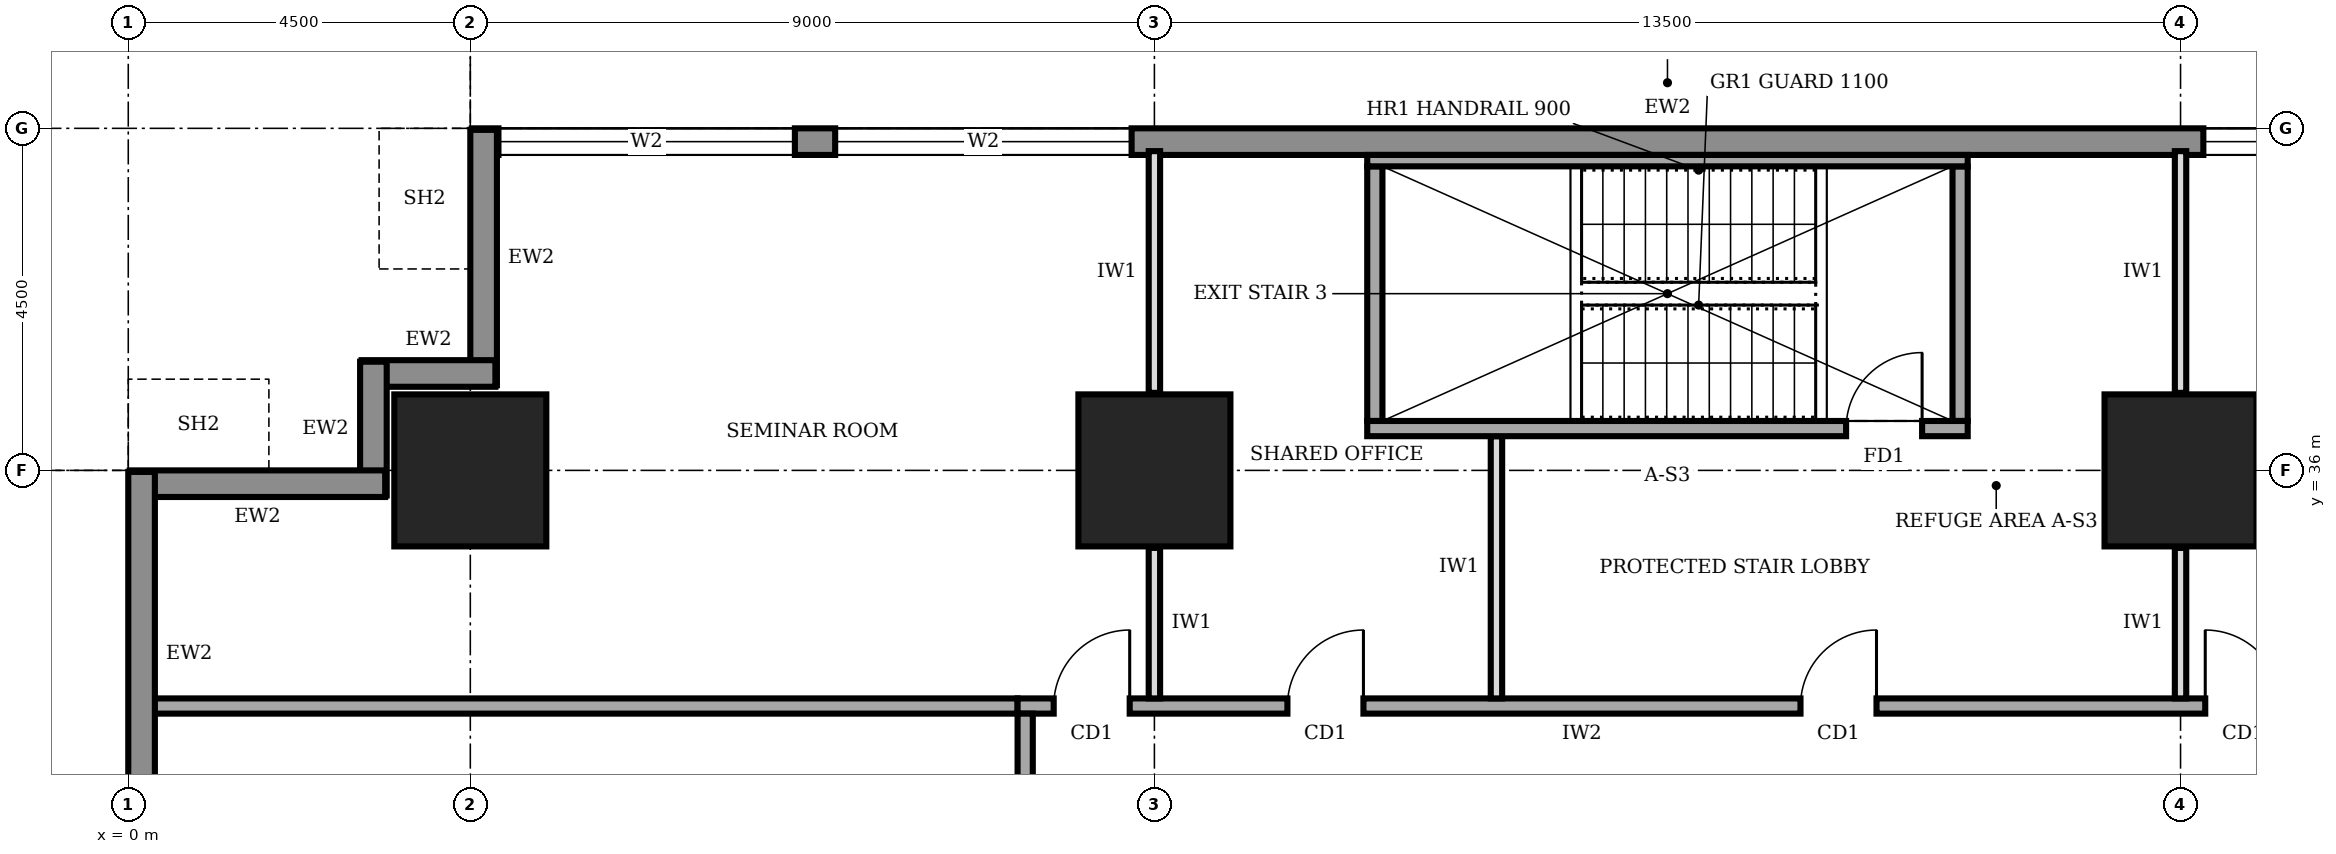
"""IFC4 building model, lengths in metres.
Left out: names, types, materials, properties, quantities, classifications, styles, units other than length and angle.
Written with IfcOpenShell. Run it as: python <this file> out.ifc"""

import sys

from ifc_helpers import new_model, si_unit, direction, frame, frame_2d, origin, origin_2d, place, context, subcontext, project, spatial, rectangle, extrude, element, fill, save


model = new_model("IFC4")
c1 = context("Model", 3, precision=1e-05, world=origin(), true_north=direction((0.0, 1.0)))
c2 = subcontext(c1, "Body", "Model", "MODEL_VIEW")
j1 = project(units=[si_unit("LENGTHUNIT", "METRE"), si_unit("PLANEANGLEUNIT", "RADIAN")], contexts=[c1])
p1 = place(None, origin())
s1 = spatial("IfcSite", under=j1, at=p1, CompositionType="ELEMENT")
p2 = place(p1, origin())
s2 = spatial("IfcBuilding", under=s1, at=p2, CompositionType="ELEMENT")
p3 = place(p2, frame((0.0, 0.0, 57.0)))
s3 = spatial("IfcBuildingStorey", under=s2, at=p3, CompositionType="ELEMENT", Elevation=57.0)
for number, where, z_axis, x_axis in (
    (1, (4.5, 36.0, 0.0), (0.0, 0.0, 1.0), (1.0, 0.0, 0.0)),
    (2, (13.5, 36.0, 0.0), (0.0, 0.0, 1.0), (1.0, 0.0, 0.0)),
    (3, (27.0, 36.0, 0.0), (0.0, 0.0, 1.0), (1.0, 0.0, 0.0)),
):
    element("IfcColumn", number, at=place(p3, frame(where, z_axis=z_axis, x_axis=x_axis)), inside=s3, PredefinedType="COLUMN", context=c2, shape_type="SweptSolid", body=[
        extrude(rectangle(XDim=2.0, YDim=2.0, at=origin_2d()), origin(), (0.0, 0.0, 1.0), 4.0),
    ])
p4 = place(p3, frame((35.98, 40.325, 0.0), z_axis=(0.0, 0.0, 1.0), x_axis=(-1.0, 0.0, 0.0)))
e4 = element("IfcWall", 4, at=p4, inside=s3, PredefinedType="STANDARD", context=c2, shape_type="SweptSolid", body=[
    extrude(rectangle(XDim=31.46, YDim=0.35, at=frame_2d((15.73, 0.0))), origin(), (0.0, 0.0, 1.0), 3.75),
])
p5 = place(p4, frame((27.21, 0.0, 0.6)))
e5 = element("IfcOpeningElement", 5, at=p5, cuts=e4, PredefinedType="OPENING", context=c2, shape_type="SweptSolid", body=[
    extrude(rectangle(XDim=3.9, YDim=2.6, at=frame_2d((1.95, 1.3))), frame((0.0, 0.185, 0.0), z_axis=(0.0, -1.0, 0.0), x_axis=(1.0, 0.0, 0.0)), (0.0, 0.0, 1.0), 0.37),
])
p6 = place(p4, frame((22.78, 0.0, 0.6)))
e6 = element("IfcOpeningElement", 6, at=p6, cuts=e4, PredefinedType="OPENING", context=c2, shape_type="SweptSolid", body=[
    extrude(rectangle(XDim=3.9, YDim=2.6, at=frame_2d((1.95, 1.3))), frame((0.0, 0.185, 0.0), z_axis=(0.0, -1.0, 0.0), x_axis=(1.0, 0.0, 0.0)), (0.0, 0.0, 1.0), 0.37),
])
p7 = place(p4, frame((4.78, 0.0, 0.6)))
e7 = element("IfcOpeningElement", 7, at=p7, cuts=e4, PredefinedType="OPENING", context=c2, shape_type="SweptSolid", body=[
    extrude(rectangle(XDim=3.9, YDim=2.6, at=frame_2d((1.95, 1.3))), frame((0.0, 0.185, 0.0), z_axis=(0.0, -1.0, 0.0), x_axis=(1.0, 0.0, 0.0)), (0.0, 0.0, 1.0), 0.37),
])
p8 = place(p3, frame((4.675, 40.48, 0.0), z_axis=(0.0, 0.0, 1.0), x_axis=(0.0, -1.0, 0.0)))
e8 = element("IfcWall", 8, at=p8, inside=s3, PredefinedType="STANDARD", context=c2, shape_type="SweptSolid", body=[
    extrude(rectangle(XDim=3.36, YDim=0.35, at=frame_2d((1.68, 0.0))), origin(), (0.0, 0.0, 1.0), 2.85),
])
for number, where, z_axis, x_axis in (
    (9, (4.83, 37.275, 0.0), (0.0, 0.0, 1.0), (-1.0, 0.0, 0.0)),
    (10, (3.225, 37.43, 0.0), (0.0, 0.0, 1.0), (0.0, -1.0, 0.0)),
):
    element("IfcWall", number, at=place(p3, frame(where, z_axis=z_axis, x_axis=x_axis)), inside=s3, PredefinedType="STANDARD", context=c2, shape_type="SweptSolid", body=[
        extrude(rectangle(XDim=1.76, YDim=0.35, at=frame_2d((0.88, 0.0))), origin(), (0.0, 0.0, 1.0), 3.75),
    ])
p9 = place(p3, frame((3.38, 35.825, 0.0), z_axis=(0.0, 0.0, 1.0), x_axis=(-1.0, 0.0, 0.0)))
e11 = element("IfcWall", 11, at=p9, inside=s3, PredefinedType="STANDARD", context=c2, shape_type="SweptSolid", body=[
    extrude(rectangle(XDim=3.36, YDim=0.35, at=frame_2d((1.68, 0.0))), origin(), (0.0, 0.0, 1.0), 2.85),
])
p10 = place(p3, frame((0.175, 35.98, 0.0), z_axis=(0.0, 0.0, 1.0), x_axis=(0.0, -1.0, 0.0)))
e12 = element("IfcWall", 12, at=p10, inside=s3, PredefinedType="STANDARD", context=c2, shape_type="SweptSolid", body=[
    extrude(rectangle(XDim=31.46, YDim=0.35, at=frame_2d((15.73, 0.0))), origin(), (0.0, 0.0, 1.0), 3.75),
])
p11 = place(p10, frame((27.21, 0.0, 0.6)))
e13 = element("IfcOpeningElement", 13, at=p11, cuts=e12, PredefinedType="OPENING", context=c2, shape_type="SweptSolid", body=[
    extrude(rectangle(XDim=3.9, YDim=2.6, at=frame_2d((1.95, 1.3))), frame((0.0, 0.185, 0.0), z_axis=(0.0, -1.0, 0.0), x_axis=(1.0, 0.0, 0.0)), (0.0, 0.0, 1.0), 0.37),
])
p12 = place(p10, frame((22.78, 0.0, 0.6)))
e14 = element("IfcOpeningElement", 14, at=p12, cuts=e12, PredefinedType="OPENING", context=c2, shape_type="SweptSolid", body=[
    extrude(rectangle(XDim=3.9, YDim=2.6, at=frame_2d((1.95, 1.3))), frame((0.0, 0.185, 0.0), z_axis=(0.0, -1.0, 0.0), x_axis=(1.0, 0.0, 0.0)), (0.0, 0.0, 1.0), 0.37),
])
p13 = place(p10, frame((18.28, 0.0, 0.6)))
e15 = element("IfcOpeningElement", 15, at=p13, cuts=e12, PredefinedType="OPENING", context=c2, shape_type="SweptSolid", body=[
    extrude(rectangle(XDim=3.9, YDim=2.6, at=frame_2d((1.95, 1.3))), frame((0.0, 0.185, 0.0), z_axis=(0.0, -1.0, 0.0), x_axis=(1.0, 0.0, 0.0)), (0.0, 0.0, 1.0), 0.37),
])
p14 = place(p10, frame((13.78, 0.0, 0.6)))
e16 = element("IfcOpeningElement", 16, at=p14, cuts=e12, PredefinedType="OPENING", context=c2, shape_type="SweptSolid", body=[
    extrude(rectangle(XDim=3.9, YDim=2.6, at=frame_2d((1.95, 1.3))), frame((0.0, 0.185, 0.0), z_axis=(0.0, -1.0, 0.0), x_axis=(1.0, 0.0, 0.0)), (0.0, 0.0, 1.0), 0.37),
])
p15 = place(p10, frame((9.28, 0.0, 0.6)))
e17 = element("IfcOpeningElement", 17, at=p15, cuts=e12, PredefinedType="OPENING", context=c2, shape_type="SweptSolid", body=[
    extrude(rectangle(XDim=3.9, YDim=2.6, at=frame_2d((1.95, 1.3))), frame((0.0, 0.185, 0.0), z_axis=(0.0, -1.0, 0.0), x_axis=(1.0, 0.0, 0.0)), (0.0, 0.0, 1.0), 0.37),
])
p16 = place(p10, frame((4.78, 0.0, 0.6)))
e18 = element("IfcOpeningElement", 18, at=p16, cuts=e12, PredefinedType="OPENING", context=c2, shape_type="SweptSolid", body=[
    extrude(rectangle(XDim=3.9, YDim=2.6, at=frame_2d((1.95, 1.3))), frame((0.0, 0.185, 0.0), z_axis=(0.0, -1.0, 0.0), x_axis=(1.0, 0.0, 0.0)), (0.0, 0.0, 1.0), 0.37),
])
p17 = place(p3, frame((28.6, 32.9, 0.0), z_axis=(0.0, 0.0, 1.0), x_axis=(-1.0, 0.0, 0.0)))
e19 = element("IfcWall", 19, at=p17, inside=s3, PredefinedType="SOLIDWALL", context=c2, shape_type="SweptSolid", body=[
    extrude(rectangle(XDim=16.9, YDim=0.2, at=frame_2d((8.45, 0.0))), origin(), (0.0, 0.0, 1.0), 3.75),
])
p18 = place(p17, frame((15.425, 0.0, 0.0)))
e20 = element("IfcOpeningElement", 20, at=p18, cuts=e19, PredefinedType="OPENING", context=c2, shape_type="SweptSolid", body=[
    extrude(rectangle(XDim=1.0, YDim=2.1, at=frame_2d((0.5, 1.05))), frame((0.0, 0.11, 0.0), z_axis=(0.0, -1.0, 0.0), x_axis=(1.0, 0.0, 0.0)), (0.0, 0.0, 1.0), 0.22),
])
p19 = place(p17, frame((12.35, 0.0, 0.0)))
e21 = element("IfcOpeningElement", 21, at=p19, cuts=e19, PredefinedType="OPENING", context=c2, shape_type="SweptSolid", body=[
    extrude(rectangle(XDim=1.0, YDim=2.1, at=frame_2d((0.5, 1.05))), frame((0.0, 0.11, 0.0), z_axis=(0.0, -1.0, 0.0), x_axis=(1.0, 0.0, 0.0)), (0.0, 0.0, 1.0), 0.22),
])
p20 = place(p17, frame((5.6, 0.0, 0.0)))
e22 = element("IfcOpeningElement", 22, at=p20, cuts=e19, PredefinedType="OPENING", context=c2, shape_type="SweptSolid", body=[
    extrude(rectangle(XDim=1.0, YDim=2.1, at=frame_2d((0.5, 1.05))), frame((0.0, 0.11, 0.0), z_axis=(0.0, -1.0, 0.0), x_axis=(1.0, 0.0, 0.0)), (0.0, 0.0, 1.0), 0.22),
])
p21 = place(p17, frame((0.275, 0.0, 0.0)))
e23 = element("IfcOpeningElement", 23, at=p21, cuts=e19, PredefinedType="OPENING", context=c2, shape_type="SweptSolid", body=[
    extrude(rectangle(XDim=1.0, YDim=2.1, at=frame_2d((0.5, 1.05))), frame((0.0, 0.11, 0.0), z_axis=(0.0, -1.0, 0.0), x_axis=(1.0, 0.0, 0.0)), (0.0, 0.0, 1.0), 0.22),
])
p22 = place(p3, frame((11.8, 32.8, 0.0), z_axis=(0.0, 0.0, 1.0), x_axis=(0.0, -1.0, 0.0)))
e24 = element("IfcWall", 24, at=p22, inside=s3, PredefinedType="SOLIDWALL", context=c2, shape_type="SweptSolid", body=[
    extrude(rectangle(XDim=23.8, YDim=0.2, at=frame_2d((11.9, 0.0))), origin(), (0.0, 0.0, 1.0), 3.75),
])
p23 = place(p22, frame((21.05, 0.0, 0.0)))
e25 = element("IfcOpeningElement", 25, at=p23, cuts=e24, PredefinedType="OPENING", context=c2, shape_type="SweptSolid", body=[
    extrude(rectangle(XDim=1.0, YDim=2.1, at=frame_2d((0.5, 1.05))), frame((0.0, 0.11, 0.0), z_axis=(0.0, -1.0, 0.0), x_axis=(1.0, 0.0, 0.0)), (0.0, 0.0, 1.0), 0.22),
])
p24 = place(p22, frame((17.7, 0.0, 0.0)))
e26 = element("IfcOpeningElement", 26, at=p24, cuts=e24, PredefinedType="OPENING", context=c2, shape_type="SweptSolid", body=[
    extrude(rectangle(XDim=1.0, YDim=2.1, at=frame_2d((0.5, 1.05))), frame((0.0, 0.11, 0.0), z_axis=(0.0, -1.0, 0.0), x_axis=(1.0, 0.0, 0.0)), (0.0, 0.0, 1.0), 0.22),
])
p25 = place(p22, frame((14.7, 0.0, 0.0)))
e27 = element("IfcOpeningElement", 27, at=p25, cuts=e24, PredefinedType="OPENING", context=c2, shape_type="SweptSolid", body=[
    extrude(rectangle(XDim=0.9, YDim=2.1, at=frame_2d((0.45, 1.05))), frame((0.0, 0.11, 0.0), z_axis=(0.0, -1.0, 0.0), x_axis=(1.0, 0.0, 0.0)), (0.0, 0.0, 1.0), 0.22),
])
p26 = place(p22, frame((11.65, 0.0, 0.0)))
e28 = element("IfcOpeningElement", 28, at=p26, cuts=e24, PredefinedType="OPENING", context=c2, shape_type="SweptSolid", body=[
    extrude(rectangle(XDim=0.9, YDim=2.1, at=frame_2d((0.45, 1.05))), frame((0.0, 0.11, 0.0), z_axis=(0.0, -1.0, 0.0), x_axis=(1.0, 0.0, 0.0)), (0.0, 0.0, 1.0), 0.22),
])
p27 = place(p22, frame((6.95, 0.0, 0.0)))
e29 = element("IfcOpeningElement", 29, at=p27, cuts=e24, PredefinedType="OPENING", context=c2, shape_type="SweptSolid", body=[
    extrude(rectangle(XDim=0.9, YDim=2.1, at=frame_2d((0.45, 1.05))), frame((0.0, 0.11, 0.0), z_axis=(0.0, -1.0, 0.0), x_axis=(1.0, 0.0, 0.0)), (0.0, 0.0, 1.0), 0.22),
])
p28 = place(p22, frame((9.5, 0.0, 0.0)))
e30 = element("IfcOpeningElement", 30, at=p28, cuts=e24, PredefinedType="OPENING", context=c2, shape_type="SweptSolid", body=[
    extrude(rectangle(XDim=1.0, YDim=2.1, at=frame_2d((0.5, 1.05))), frame((0.0, 0.11, 0.0), z_axis=(0.0, -1.0, 0.0), x_axis=(1.0, 0.0, 0.0)), (0.0, 0.0, 1.0), 0.22),
])
p29 = place(p22, frame((2.3, 0.0, 0.0)))
e31 = element("IfcOpeningElement", 31, at=p29, cuts=e24, PredefinedType="OPENING", context=c2, shape_type="SweptSolid", body=[
    extrude(rectangle(XDim=1.0, YDim=2.1, at=frame_2d((0.5, 1.05))), frame((0.0, 0.11, 0.0), z_axis=(0.0, -1.0, 0.0), x_axis=(1.0, 0.0, 0.0)), (0.0, 0.0, 1.0), 0.22),
])
p30 = place(p3, frame((0.3, 32.9, 0.0), z_axis=(0.0, 0.0, 1.0), x_axis=(1.0, 0.0, 0.0)))
e32 = element("IfcWall", 32, at=p30, inside=s3, PredefinedType="SOLIDWALL", context=c2, shape_type="SweptSolid", body=[
    extrude(rectangle(XDim=11.4, YDim=0.2, at=frame_2d((5.7, 0.0))), origin(), (0.0, 0.0, 1.0), 3.75),
])
p31 = place(p3, frame((13.5, 33.0, 0.0), z_axis=(0.0, 0.0, 1.0), x_axis=(0.0, 1.0, 0.0)))
e33 = element("IfcWall", 33, at=p31, inside=s3, PredefinedType="PARTITIONING", context=c2, shape_type="SweptSolid", body=[
    extrude(rectangle(XDim=1.98, YDim=0.15, at=frame_2d((0.99, 0.0))), origin(), (0.0, 0.0, 1.0), 2.85),
])
p32 = place(p3, frame((13.5, 37.02, 0.0), z_axis=(0.0, 0.0, 1.0), x_axis=(0.0, 1.0, 0.0)))
e34 = element("IfcWall", 34, at=p32, inside=s3, PredefinedType="PARTITIONING", context=c2, shape_type="SweptSolid", body=[
    extrude(rectangle(XDim=3.18, YDim=0.15, at=frame_2d((1.59, 0.0))), origin(), (0.0, 0.0, 1.0), 2.85),
])
p33 = place(p3, frame((18.0, 33.0, 0.0), z_axis=(0.0, 0.0, 1.0), x_axis=(0.0, 1.0, 0.0)))
e35 = element("IfcWall", 35, at=p33, inside=s3, PredefinedType="PARTITIONING", context=c2, shape_type="SweptSolid", body=[
    extrude(rectangle(XDim=3.45, YDim=0.15, at=frame_2d((1.725, 0.0))), origin(), (0.0, 0.0, 1.0), 3.75),
])
p34 = place(p3, frame((27.0, 33.0, 0.0), z_axis=(0.0, 0.0, 1.0), x_axis=(0.0, 1.0, 0.0)))
e36 = element("IfcWall", 36, at=p34, inside=s3, PredefinedType="PARTITIONING", context=c2, shape_type="SweptSolid", body=[
    extrude(rectangle(XDim=1.98, YDim=0.15, at=frame_2d((0.99, 0.0))), origin(), (0.0, 0.0, 1.0), 2.85),
])
p35 = place(p3, frame((27.0, 37.02, 0.0), z_axis=(0.0, 0.0, 1.0), x_axis=(0.0, 1.0, 0.0)))
e37 = element("IfcWall", 37, at=p35, inside=s3, PredefinedType="PARTITIONING", context=c2, shape_type="SweptSolid", body=[
    extrude(rectangle(XDim=3.18, YDim=0.15, at=frame_2d((1.59, 0.0))), origin(), (0.0, 0.0, 1.0), 2.85),
])
p36 = place(p3, frame((16.3, 36.55, 0.0), z_axis=(0.0, 0.0, 1.0), x_axis=(1.0, 0.0, 0.0)))
e38 = element("IfcWall", 38, at=p36, inside=s3, PredefinedType="SOLIDWALL", context=c2, shape_type="SweptSolid", body=[
    extrude(rectangle(XDim=7.9, YDim=0.2, at=frame_2d((3.95, 0.0))), origin(), (0.0, 0.0, 1.0), 3.75),
])
p37 = place(p36, frame((6.3, 0.0, 0.0)))
e39 = element("IfcOpeningElement", 39, at=p37, cuts=e38, PredefinedType="OPENING", context=c2, shape_type="SweptSolid", body=[
    extrude(rectangle(XDim=1.0, YDim=2.1, at=frame_2d((0.5, 1.05))), frame((0.0, 0.11, 0.0), z_axis=(0.0, -1.0, 0.0), x_axis=(1.0, 0.0, 0.0)), (0.0, 0.0, 1.0), 0.22),
])
p38 = place(p3, frame((16.3, 40.075, 0.0), z_axis=(0.0, 0.0, 1.0), x_axis=(1.0, 0.0, 0.0)))
e40 = element("IfcWall", 40, at=p38, inside=s3, PredefinedType="SOLIDWALL", context=c2, shape_type="SweptSolid", body=[
    extrude(rectangle(XDim=7.9, YDim=0.15, at=frame_2d((3.95, 0.0))), origin(), (0.0, 0.0, 1.0), 3.75),
])
for number, where, z_axis, x_axis in (
    (41, (16.4, 36.65, 0.0), (0.0, 0.0, 1.0), (0.0, 1.0, 0.0)),
    (42, (24.1, 36.65, 0.0), (0.0, 0.0, 1.0), (0.0, 1.0, 0.0)),
):
    element("IfcWall", number, at=place(p3, frame(where, z_axis=z_axis, x_axis=x_axis)), inside=s3, PredefinedType="SOLIDWALL", context=c2, shape_type="SweptSolid", body=[
        extrude(rectangle(XDim=3.35, YDim=0.2, at=frame_2d((1.675, 0.0))), origin(), (0.0, 0.0, 1.0), 3.75),
    ])
p39 = place(p5, origin())
e43 = element("IfcWindow", 43, at=p39, inside=s3, PartitioningType="SINGLE_PANEL", PredefinedType="WINDOW", context=c2, shape_type="SweptSolid", body=[
    extrude(rectangle(XDim=3.9, YDim=2.6, at=frame_2d((1.95, 1.3))), frame((0.0, 0.03, 0.0), z_axis=(0.0, -1.0, 0.0), x_axis=(1.0, 0.0, 0.0)), (0.0, 0.0, 1.0), 0.06),
])
fill(e5, e43)
p40 = place(p6, origin())
e44 = element("IfcWindow", 44, at=p40, inside=s3, PartitioningType="SINGLE_PANEL", PredefinedType="WINDOW", context=c2, shape_type="SweptSolid", body=[
    extrude(rectangle(XDim=3.9, YDim=2.6, at=frame_2d((1.95, 1.3))), frame((0.0, 0.03, 0.0), z_axis=(0.0, -1.0, 0.0), x_axis=(1.0, 0.0, 0.0)), (0.0, 0.0, 1.0), 0.06),
])
fill(e6, e44)
p41 = place(p7, origin())
e45 = element("IfcWindow", 45, at=p41, inside=s3, PartitioningType="SINGLE_PANEL", PredefinedType="WINDOW", context=c2, shape_type="SweptSolid", body=[
    extrude(rectangle(XDim=3.9, YDim=2.6, at=frame_2d((1.95, 1.3))), frame((0.0, 0.03, 0.0), z_axis=(0.0, -1.0, 0.0), x_axis=(1.0, 0.0, 0.0)), (0.0, 0.0, 1.0), 0.06),
])
fill(e7, e45)
p42 = place(p18, frame((1.0, 0.0, 0.0), z_axis=(0.0, 0.0, 1.0), x_axis=(-1.0, 0.0, 0.0)))
e46 = element("IfcDoor", 46, at=p42, inside=s3, OperationType="SINGLE_SWING_RIGHT", PredefinedType="DOOR", context=c2, shape_type="SweptSolid", body=[
    extrude(rectangle(XDim=1.0, YDim=2.1, at=frame_2d((0.5, 1.05))), frame((0.0, 0.025, 0.0), z_axis=(0.0, -1.0, 0.0), x_axis=(1.0, 0.0, 0.0)), (0.0, 0.0, 1.0), 0.05),
])
fill(e20, e46)
p43 = place(p19, frame((1.0, 0.0, 0.0), z_axis=(0.0, 0.0, 1.0), x_axis=(-1.0, 0.0, 0.0)))
e47 = element("IfcDoor", 47, at=p43, inside=s3, OperationType="SINGLE_SWING_RIGHT", PredefinedType="DOOR", context=c2, shape_type="SweptSolid", body=[
    extrude(rectangle(XDim=1.0, YDim=2.1, at=frame_2d((0.5, 1.05))), frame((0.0, 0.025, 0.0), z_axis=(0.0, -1.0, 0.0), x_axis=(1.0, 0.0, 0.0)), (0.0, 0.0, 1.0), 0.05),
])
fill(e21, e47)
p44 = place(p20, frame((1.0, 0.0, 0.0), z_axis=(0.0, 0.0, 1.0), x_axis=(-1.0, 0.0, 0.0)))
e48 = element("IfcDoor", 48, at=p44, inside=s3, OperationType="SINGLE_SWING_RIGHT", PredefinedType="DOOR", context=c2, shape_type="SweptSolid", body=[
    extrude(rectangle(XDim=1.0, YDim=2.1, at=frame_2d((0.5, 1.05))), frame((0.0, 0.025, 0.0), z_axis=(0.0, -1.0, 0.0), x_axis=(1.0, 0.0, 0.0)), (0.0, 0.0, 1.0), 0.05),
])
fill(e22, e48)
p45 = place(p21, frame((1.0, 0.0, 0.0), z_axis=(0.0, 0.0, 1.0), x_axis=(-1.0, 0.0, 0.0)))
e49 = element("IfcDoor", 49, at=p45, inside=s3, OperationType="SINGLE_SWING_LEFT", PredefinedType="DOOR", context=c2, shape_type="SweptSolid", body=[
    extrude(rectangle(XDim=1.0, YDim=2.1, at=frame_2d((0.5, 1.05))), frame((0.0, 0.025, 0.0), z_axis=(0.0, -1.0, 0.0), x_axis=(1.0, 0.0, 0.0)), (0.0, 0.0, 1.0), 0.05),
])
fill(e23, e49)
p46 = place(p37, origin())
e50 = element("IfcDoor", 50, at=p46, inside=s3, OperationType="SINGLE_SWING_RIGHT", PredefinedType="DOOR", context=c2, shape_type="SweptSolid", body=[
    extrude(rectangle(XDim=1.0, YDim=2.1, at=frame_2d((0.5, 1.05))), frame((0.0, 0.025, 0.0), z_axis=(0.0, -1.0, 0.0), x_axis=(1.0, 0.0, 0.0)), (0.0, 0.0, 1.0), 0.05),
])
fill(e39, e50)
save(model, sys.argv[1])
